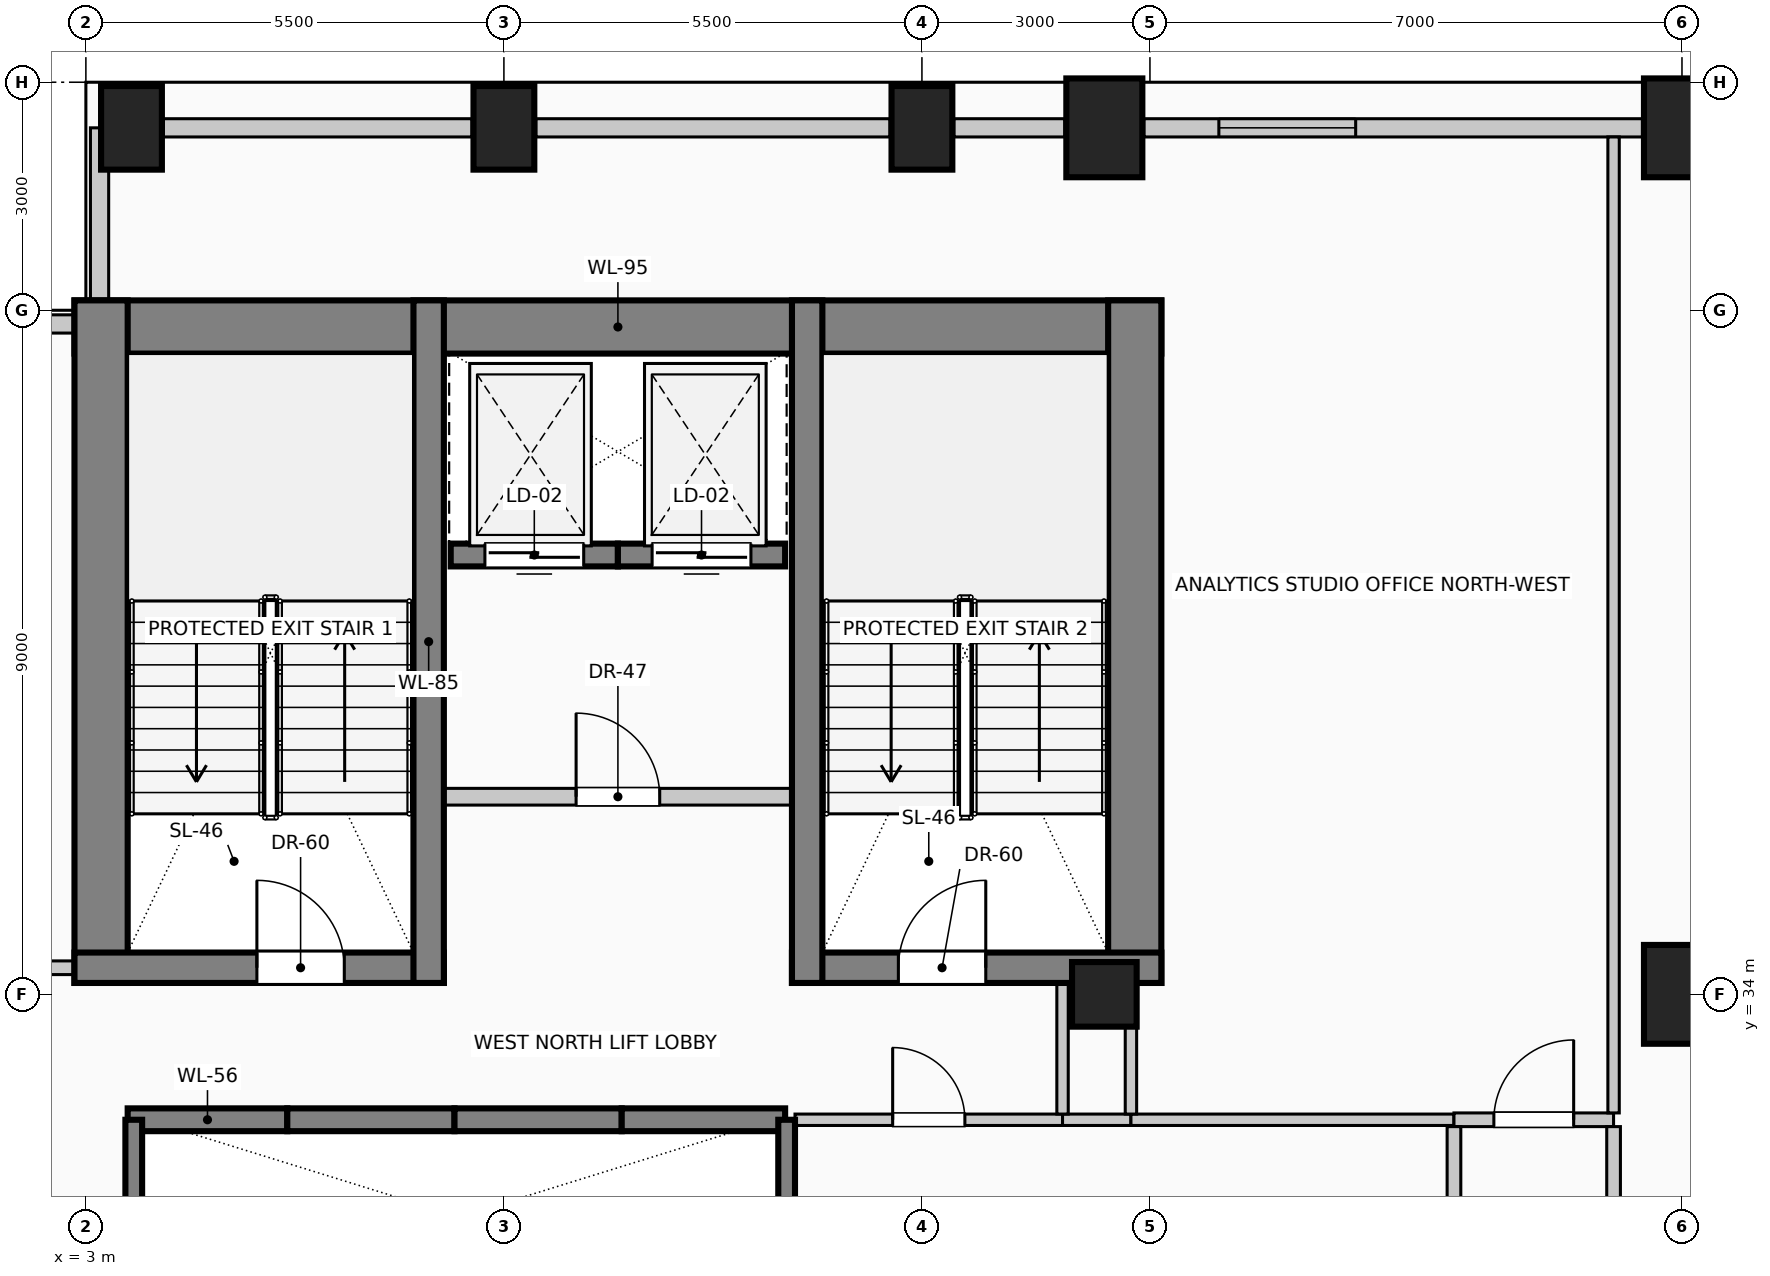
"""IFC4 building model, lengths in metres.
Left out: names, types, materials, properties, quantities, classifications, styles, units other than length and angle.
Written with IfcOpenShell. Run it as: python <this file> out.ifc"""

import sys

from ifc_helpers import new_model, si_unit, direction, frame, frame_2d, origin, origin_2d, place, context, subcontext, project, spatial, rectangle, circle, extrude, element, fill, save


model = new_model("IFC4")
c1 = context("Model", 3, precision=1e-05, world=origin(), true_north=direction((0.0, 1.0)))
c2 = subcontext(c1, "Body", "Model", "MODEL_VIEW")
j1 = project(units=[si_unit("LENGTHUNIT", "METRE"), si_unit("PLANEANGLEUNIT", "RADIAN")], contexts=[c1])
p1 = place(None, origin())
s1 = spatial("IfcSite", under=j1, at=p1, CompositionType="ELEMENT")
p2 = place(p1, origin())
s2 = spatial("IfcBuilding", under=s1, at=p2, CompositionType="ELEMENT")
p3 = place(p2, frame((0.0, 0.0, 206.6)))
s3 = spatial("IfcBuildingStorey", under=s2, at=p3, CompositionType="ELEMENT", Elevation=206.6)
p4 = place(p3, frame((2.85, 42.78, 0.0), z_axis=(0.0, 0.0, 1.0), x_axis=(1.0, 0.0, 0.0)))
e1 = element("IfcWall", 1, at=p4, inside=s3, PredefinedType="SHEAR", context=c2, shape_type="SweptSolid", body=[
    extrude(rectangle(XDim=14.3, YDim=0.7, at=frame_2d((7.15, 0.0))), origin(), (0.0, 0.0, 1.0), 4.0),
])
for number, where, z_axis, x_axis in (
    (2, (3.2, 34.15, 0.0), (0.0, 0.0, 1.0), (0.0, 1.0, 0.0)),
    (3, (16.8, 34.15, 0.0), (0.0, 0.0, 1.0), (0.0, 1.0, 0.0)),
):
    element("IfcWall", number, at=place(p3, frame(where, z_axis=z_axis, x_axis=x_axis)), inside=s3, PredefinedType="SHEAR", context=c2, shape_type="SweptSolid", body=[
        extrude(rectangle(XDim=8.98, YDim=0.7, at=frame_2d((4.49, 0.0))), origin(), (0.0, 0.0, 1.0), 4.0),
    ])
p5 = place(p3, frame((2.85, 34.35, 0.0), z_axis=(0.0, 0.0, 1.0), x_axis=(1.0, 0.0, 0.0)))
e4 = element("IfcWall", 4, at=p5, inside=s3, PredefinedType="SHEAR", context=c2, shape_type="SweptSolid", body=[
    extrude(rectangle(XDim=4.86, YDim=0.4, at=frame_2d((2.43, 0.0))), origin(), (0.0, 0.0, 1.0), 4.0),
])
p6 = place(p5, frame((2.4, 0.0, 0.0)))
e5 = element("IfcOpeningElement", 5, at=p6, cuts=e4, PredefinedType="OPENING", context=c2, shape_type="SweptSolid", body=[
    extrude(rectangle(XDim=1.15, YDim=2.2, at=frame_2d((0.575, 1.1))), frame((0.0, 0.21, 0.0), z_axis=(0.0, -1.0, 0.0), x_axis=(1.0, 0.0, 0.0)), (0.0, 0.0, 1.0), 0.42),
])
p7 = place(p3, frame((12.29, 34.35, 0.0), z_axis=(0.0, 0.0, 1.0), x_axis=(1.0, 0.0, 0.0)))
e6 = element("IfcWall", 6, at=p7, inside=s3, PredefinedType="SHEAR", context=c2, shape_type="SweptSolid", body=[
    extrude(rectangle(XDim=4.86, YDim=0.4, at=frame_2d((2.43, 0.0))), origin(), (0.0, 0.0, 1.0), 4.0),
])
p8 = place(p7, frame((1.4, 0.0, 0.0)))
e7 = element("IfcOpeningElement", 7, at=p8, cuts=e6, PredefinedType="OPENING", context=c2, shape_type="SweptSolid", body=[
    extrude(rectangle(XDim=1.15, YDim=2.2, at=frame_2d((0.575, 1.1))), frame((0.0, 0.21, 0.0), z_axis=(0.0, -1.0, 0.0), x_axis=(1.0, 0.0, 0.0)), (0.0, 0.0, 1.0), 0.42),
])
for number, where, z_axis, x_axis in (
    (8, (7.51, 34.15, 0.0), (0.0, 0.0, 1.0), (0.0, 1.0, 0.0)),
    (9, (12.49, 34.15, 0.0), (0.0, 0.0, 1.0), (0.0, 1.0, 0.0)),
):
    element("IfcWall", number, at=place(p3, frame(where, z_axis=z_axis, x_axis=x_axis)), inside=s3, PredefinedType="SHEAR", context=c2, shape_type="SweptSolid", body=[
        extrude(rectangle(XDim=8.98, YDim=0.4, at=frame_2d((4.49, 0.0))), origin(), (0.0, 0.0, 1.0), 4.0),
    ])
for number, where, z_axis, x_axis in (
    (10, (3.6, 45.4, 0.0), (0.0, 0.0, 1.0), (1.0, 0.0, 0.0)),
    (11, (8.5, 45.4, 0.0), (0.0, 0.0, 1.0), (1.0, 0.0, 0.0)),
    (12, (14.0, 45.4, 0.0), (0.0, 0.0, 1.0), (1.0, 0.0, 0.0)),
):
    element("IfcColumn", number, at=place(p3, frame(where, z_axis=z_axis, x_axis=x_axis)), inside=s3, PredefinedType="COLUMN", context=c2, shape_type="SweptSolid", body=[
        extrude(rectangle(XDim=0.8, YDim=1.1, at=origin_2d()), origin(), (0.0, 0.0, 1.0), 4.0),
    ])
for number, where, z_axis, x_axis in (
    (13, (16.4, 45.4, 0.0), (0.0, 0.0, 1.0), (1.0, 0.0, 0.0)),
    (14, (24.0, 45.4, 0.0), (0.0, 0.0, 1.0), (1.0, 0.0, 0.0)),
    (15, (24.0, 34.0, 0.0), (0.0, 0.0, 1.0), (1.0, 0.0, 0.0)),
):
    element("IfcColumn", number, at=place(p3, frame(where, z_axis=z_axis, x_axis=x_axis)), inside=s3, PredefinedType="COLUMN", context=c2, shape_type="SweptSolid", body=[
        extrude(rectangle(XDim=1.0, YDim=1.3, at=origin_2d()), origin(), (0.0, 0.0, 1.0), 4.0),
    ])
p9 = place(p3, frame((16.4, 34.0, 0.0), z_axis=(0.0, 0.0, 1.0), x_axis=(1.0, 0.0, 0.0)))
e16 = element("IfcColumn", 16, at=p9, inside=s3, PredefinedType="COLUMN", context=c2, shape_type="SweptSolid", body=[
    extrude(circle(Radius=0.425, at=origin_2d()), origin(), (0.0, 0.0, 1.0), 4.0),
])
p10 = place(p3, frame((4.02, 45.4, 0.0), z_axis=(0.0, 0.0, 1.0), x_axis=(1.0, 0.0, 0.0)))
e17 = element("IfcWall", 17, at=p10, inside=s3, PredefinedType="SOLIDWALL", context=c2, shape_type="SweptSolid", body=[
    extrude(rectangle(XDim=4.06, YDim=0.24, at=frame_2d((2.03, 0.0))), origin(), (0.0, 0.0, 1.0), 3.0),
])
p11 = place(p3, frame((8.92, 45.4, 0.0), z_axis=(0.0, 0.0, 1.0), x_axis=(1.0, 0.0, 0.0)))
e18 = element("IfcWall", 18, at=p11, inside=s3, PredefinedType="SOLIDWALL", context=c2, shape_type="SweptSolid", body=[
    extrude(rectangle(XDim=4.66, YDim=0.24, at=frame_2d((2.33, 0.0))), origin(), (0.0, 0.0, 1.0), 3.0),
])
p12 = place(p3, frame((14.42, 45.4, 0.0), z_axis=(0.0, 0.0, 1.0), x_axis=(1.0, 0.0, 0.0)))
e19 = element("IfcWall", 19, at=p12, inside=s3, PredefinedType="SOLIDWALL", context=c2, shape_type="SweptSolid", body=[
    extrude(rectangle(XDim=1.46, YDim=0.24, at=frame_2d((0.73, 0.0))), origin(), (0.0, 0.0, 1.0), 3.0),
])
p13 = place(p3, frame((16.92, 45.4, 0.0), z_axis=(0.0, 0.0, 1.0), x_axis=(1.0, 0.0, 0.0)))
e20 = element("IfcWall", 20, at=p13, inside=s3, PredefinedType="SOLIDWALL", context=c2, shape_type="SweptSolid", body=[
    extrude(rectangle(XDim=6.56, YDim=0.24, at=frame_2d((3.28, 0.0))), origin(), (0.0, 0.0, 1.0), 3.0),
])
p14 = place(p13, frame((0.987, 0.0, 0.42)))
e21 = element("IfcOpeningElement", 21, at=p14, cuts=e20, PredefinedType="OPENING", context=c2, shape_type="SweptSolid", body=[
    extrude(rectangle(XDim=1.8, YDim=2.2, at=frame_2d((0.9, 1.1))), frame((0.0, 0.13, 0.0), z_axis=(0.0, -1.0, 0.0), x_axis=(1.0, 0.0, 0.0)), (0.0, 0.0, 1.0), 0.26),
])
p15 = place(p3, frame((0.6, 42.82, 0.0), z_axis=(0.0, 0.0, 1.0), x_axis=(1.0, 0.0, 0.0)))
e22 = element("IfcWall", 22, at=p15, inside=s3, PredefinedType="SOLIDWALL", context=c2, shape_type="SweptSolid", body=[
    extrude(rectangle(XDim=2.245, YDim=0.24, at=frame_2d((1.123, 0.0))), origin(), (0.0, 0.0, 1.0), 3.75),
])
p16 = place(p3, frame((3.18, 43.135, 0.0), z_axis=(0.0, 0.0, 1.0), x_axis=(0.0, 1.0, 0.0)))
e23 = element("IfcWall", 23, at=p16, inside=s3, PredefinedType="SOLIDWALL", context=c2, shape_type="SweptSolid", body=[
    extrude(rectangle(XDim=2.265, YDim=0.24, at=frame_2d((1.132, 0.0))), origin(), (0.0, 0.0, 1.0), 3.75),
])
p17 = place(p3, frame((3.55, 32.35, 0.0), z_axis=(0.0, 0.0, 1.0), x_axis=(1.0, 0.0, 0.0)))
e24 = element("IfcWall", 24, at=p17, inside=s3, PredefinedType="SOLIDWALL", context=c2, shape_type="SweptSolid", body=[
    extrude(rectangle(XDim=2.1, YDim=0.3, at=frame_2d((1.05, 0.0))), origin(), (0.0, 0.0, 1.0), 4.0),
])
p18 = place(p3, frame((5.65, 32.35, 0.0), z_axis=(0.0, 0.0, 1.0), x_axis=(1.0, 0.0, 0.0)))
e25 = element("IfcWall", 25, at=p18, inside=s3, PredefinedType="SOLIDWALL", context=c2, shape_type="SweptSolid", body=[
    extrude(rectangle(XDim=2.2, YDim=0.3, at=frame_2d((1.1, 0.0))), origin(), (0.0, 0.0, 1.0), 4.0),
])
p19 = place(p3, frame((7.85, 32.35, 0.0), z_axis=(0.0, 0.0, 1.0), x_axis=(1.0, 0.0, 0.0)))
e26 = element("IfcWall", 26, at=p19, inside=s3, PredefinedType="SOLIDWALL", context=c2, shape_type="SweptSolid", body=[
    extrude(rectangle(XDim=2.2, YDim=0.3, at=frame_2d((1.1, 0.0))), origin(), (0.0, 0.0, 1.0), 4.0),
])
p20 = place(p3, frame((10.05, 32.35, 0.0), z_axis=(0.0, 0.0, 1.0), x_axis=(1.0, 0.0, 0.0)))
e27 = element("IfcWall", 27, at=p20, inside=s3, PredefinedType="SOLIDWALL", context=c2, shape_type="SweptSolid", body=[
    extrude(rectangle(XDim=2.15, YDim=0.3, at=frame_2d((1.075, 0.0))), origin(), (0.0, 0.0, 1.0), 4.0),
])
p21 = place(p3, frame((10.0, 39.78, 0.0), z_axis=(0.0, 0.0, 1.0), x_axis=(-1.0, 0.0, 0.0)))
e28 = element("IfcWall", 28, at=p21, inside=s3, PredefinedType="SOLIDWALL", context=c2, shape_type="SweptSolid", body=[
    extrude(rectangle(XDim=2.2, YDim=0.3, at=frame_2d((1.1, 0.0))), origin(), (0.0, 0.0, 1.0), 4.0),
])
p22 = place(p21, frame((0.45, 0.0, 0.0)))
e29 = element("IfcOpeningElement", 29, at=p22, cuts=e28, PredefinedType="OPENING", context=c2, shape_type="SweptSolid", body=[
    extrude(rectangle(XDim=1.3, YDim=2.25, at=frame_2d((0.65, 1.125))), frame((0.0, 0.16, 0.0), z_axis=(0.0, -1.0, 0.0), x_axis=(1.0, 0.0, 0.0)), (0.0, 0.0, 1.0), 0.32),
])
p23 = place(p3, frame((12.2, 39.78, 0.0), z_axis=(0.0, 0.0, 1.0), x_axis=(-1.0, 0.0, 0.0)))
e30 = element("IfcWall", 30, at=p23, inside=s3, PredefinedType="SOLIDWALL", context=c2, shape_type="SweptSolid", body=[
    extrude(rectangle(XDim=2.2, YDim=0.3, at=frame_2d((1.1, 0.0))), origin(), (0.0, 0.0, 1.0), 4.0),
])
p24 = place(p23, frame((0.45, 0.0, 0.0)))
e31 = element("IfcOpeningElement", 31, at=p24, cuts=e30, PredefinedType="OPENING", context=c2, shape_type="SweptSolid", body=[
    extrude(rectangle(XDim=1.3, YDim=2.25, at=frame_2d((0.65, 1.125))), frame((0.0, 0.16, 0.0), z_axis=(0.0, -1.0, 0.0), x_axis=(1.0, 0.0, 0.0)), (0.0, 0.0, 1.0), 0.32),
])
p25 = place(p3, frame((3.63, 26.8, 0.0), z_axis=(0.0, 0.0, 1.0), x_axis=(0.0, 1.0, 0.0)))
e32 = element("IfcWall", 32, at=p25, inside=s3, PredefinedType="SOLIDWALL", context=c2, shape_type="SweptSolid", body=[
    extrude(rectangle(XDim=5.55, YDim=0.22, at=frame_2d((2.775, 0.0))), origin(), (0.0, 0.0, 1.0), 4.0),
])
p26 = place(p3, frame((12.22, 29.75, 0.0), z_axis=(0.0, 0.0, 1.0), x_axis=(0.0, 1.0, 0.0)))
e33 = element("IfcWall", 33, at=p26, inside=s3, PredefinedType="SOLIDWALL", context=c2, shape_type="SweptSolid", body=[
    extrude(rectangle(XDim=2.6, YDim=0.22, at=frame_2d((1.3, 0.0))), origin(), (0.0, 0.0, 1.0), 4.0),
])
p27 = place(p3, frame((7.51, 36.6, 0.0), z_axis=(0.0, 0.0, 1.0), x_axis=(1.0, 0.0, 0.0)))
e34 = element("IfcWall", 34, at=p27, inside=s3, PredefinedType="PARTITIONING", context=c2, shape_type="SweptSolid", body=[
    extrude(rectangle(XDim=4.98, YDim=0.22, at=frame_2d((2.49, 0.0))), origin(), (0.0, 0.0, 1.0), 3.75),
])
p28 = place(p27, frame((1.94, 0.0, 0.0)))
e35 = element("IfcOpeningElement", 35, at=p28, cuts=e34, PredefinedType="OPENING", context=c2, shape_type="SweptSolid", body=[
    extrude(rectangle(XDim=1.1, YDim=2.2, at=frame_2d((0.55, 1.1))), frame((0.0, 0.12, 0.0), z_axis=(0.0, -1.0, 0.0), x_axis=(1.0, 0.0, 0.0)), (0.0, 0.0, 1.0), 0.24),
])
p29 = place(p3, frame((12.33, 32.35, 0.0), z_axis=(0.0, 0.0, 1.0), x_axis=(1.0, 0.0, 0.0)))
e36 = element("IfcWall", 36, at=p29, inside=s3, PredefinedType="PARTITIONING", context=c2, shape_type="SweptSolid", body=[
    extrude(rectangle(XDim=3.52, YDim=0.15, at=frame_2d((1.76, 0.0))), origin(), (0.0, 0.0, 1.0), 3.75),
])
p30 = place(p29, frame((1.285, 0.0, 0.0)))
e37 = element("IfcOpeningElement", 37, at=p30, cuts=e36, PredefinedType="OPENING", context=c2, shape_type="SweptSolid", body=[
    extrude(rectangle(XDim=0.95, YDim=2.15, at=frame_2d((0.475, 1.075))), frame((0.0, 0.085, 0.0), z_axis=(0.0, -1.0, 0.0), x_axis=(1.0, 0.0, 0.0)), (0.0, 0.0, 1.0), 0.17),
])
p31 = place(p3, frame((15.85, 32.35, 0.0), z_axis=(0.0, 0.0, 1.0), x_axis=(1.0, 0.0, 0.0)))
e38 = element("IfcWall", 38, at=p31, inside=s3, PredefinedType="PARTITIONING", context=c2, shape_type="SweptSolid", body=[
    extrude(rectangle(XDim=0.9, YDim=0.15, at=frame_2d((0.45, 0.0))), origin(), (0.0, 0.0, 1.0), 3.75),
])
p32 = place(p3, frame((16.75, 32.35, 0.0), z_axis=(0.0, 0.0, 1.0), x_axis=(1.0, 0.0, 0.0)))
e39 = element("IfcWall", 39, at=p32, inside=s3, PredefinedType="PARTITIONING", context=c2, shape_type="SweptSolid", body=[
    extrude(rectangle(XDim=4.25, YDim=0.15, at=frame_2d((2.125, 0.0))), origin(), (0.0, 0.0, 1.0), 3.75),
])
p33 = place(p3, frame((21.0, 32.35, 0.0), z_axis=(0.0, 0.0, 1.0), x_axis=(1.0, 0.0, 0.0)))
e40 = element("IfcWall", 40, at=p33, inside=s3, PredefinedType="PARTITIONING", context=c2, shape_type="SweptSolid", body=[
    extrude(rectangle(XDim=2.1, YDim=0.18, at=frame_2d((1.05, 0.0))), origin(), (0.0, 0.0, 1.0), 3.75),
])
p34 = place(p33, frame((0.525, 0.0, 0.0)))
e41 = element("IfcOpeningElement", 41, at=p34, cuts=e40, PredefinedType="OPENING", context=c2, shape_type="SweptSolid", body=[
    extrude(rectangle(XDim=1.05, YDim=2.15, at=frame_2d((0.525, 1.075))), frame((0.0, 0.1, 0.0), z_axis=(0.0, -1.0, 0.0), x_axis=(1.0, 0.0, 0.0)), (0.0, 0.0, 1.0), 0.2),
])
p35 = place(p3, frame((1.15, 34.35, 0.0), z_axis=(0.0, 0.0, 1.0), x_axis=(1.0, 0.0, 0.0)))
e42 = element("IfcWall", 42, at=p35, inside=s3, PredefinedType="PARTITIONING", context=c2, shape_type="SweptSolid", body=[
    extrude(rectangle(XDim=1.7, YDim=0.18, at=frame_2d((0.85, 0.0))), origin(), (0.0, 0.0, 1.0), 3.75),
])
p36 = place(p3, frame((15.85, 32.425, 0.0), z_axis=(0.0, 0.0, 1.0), x_axis=(0.0, 1.0, 0.0)))
e43 = element("IfcWall", 43, at=p36, inside=s3, PredefinedType="PARTITIONING", context=c2, shape_type="SweptSolid", body=[
    extrude(rectangle(XDim=1.725, YDim=0.15, at=frame_2d((0.862, 0.0))), origin(), (0.0, 0.0, 1.0), 3.75),
])
p37 = place(p3, frame((16.75, 32.425, 0.0), z_axis=(0.0, 0.0, 1.0), x_axis=(0.0, 1.0, 0.0)))
e44 = element("IfcWall", 44, at=p37, inside=s3, PredefinedType="PARTITIONING", context=c2, shape_type="SweptSolid", body=[
    extrude(rectangle(XDim=1.15, YDim=0.15, at=frame_2d((0.575, 0.0))), origin(), (0.0, 0.0, 1.0), 3.75),
])
p38 = place(p3, frame((21.0, 28.675, 0.0), z_axis=(0.0, 0.0, 1.0), x_axis=(0.0, 1.0, 0.0)))
e45 = element("IfcWall", 45, at=p38, inside=s3, PredefinedType="PARTITIONING", context=c2, shape_type="SweptSolid", body=[
    extrude(rectangle(XDim=3.585, YDim=0.18, at=frame_2d((1.792, 0.0))), origin(), (0.0, 0.0, 1.0), 3.75),
])
p39 = place(p3, frame((23.1, 29.14, 0.0), z_axis=(0.0, 0.0, 1.0), x_axis=(0.0, 1.0, 0.0)))
e46 = element("IfcWall", 46, at=p39, inside=s3, PredefinedType="PARTITIONING", context=c2, shape_type="SweptSolid", body=[
    extrude(rectangle(XDim=3.12, YDim=0.18, at=frame_2d((1.56, 0.0))), origin(), (0.0, 0.0, 1.0), 3.75),
])
p40 = place(p3, frame((23.1, 32.44, 0.0), z_axis=(0.0, 0.0, 1.0), x_axis=(0.0, 1.0, 0.0)))
e47 = element("IfcWall", 47, at=p40, inside=s3, PredefinedType="PARTITIONING", context=c2, shape_type="SweptSolid", body=[
    extrude(rectangle(XDim=12.84, YDim=0.15, at=frame_2d((6.42, 0.0))), origin(), (0.0, 0.0, 1.0), 3.75),
])
p41 = place(p14, origin())
e48 = element("IfcWindow", 48, at=p41, inside=s3, PartitioningType="SINGLE_PANEL", PredefinedType="WINDOW", context=c2, shape_type="SweptSolid", body=[
    extrude(rectangle(XDim=1.8, YDim=2.2, at=frame_2d((0.9, 1.1))), frame((0.0, 0.03, 0.0), z_axis=(0.0, -1.0, 0.0), x_axis=(1.0, 0.0, 0.0)), (0.0, 0.0, 1.0), 0.06),
])
fill(e21, e48)
p42 = place(p22, origin())
e49 = element("IfcDoor", 49, at=p42, inside=s3, OperationType="SLIDING_TO_LEFT", PredefinedType="DOOR", context=c2, shape_type="SweptSolid", body=[
    extrude(rectangle(XDim=1.3, YDim=2.25, at=frame_2d((0.65, 1.125))), frame((0.0, 0.025, 0.0), z_axis=(0.0, -1.0, 0.0), x_axis=(1.0, 0.0, 0.0)), (0.0, 0.0, 1.0), 0.05),
])
fill(e29, e49)
p43 = place(p24, origin())
e50 = element("IfcDoor", 50, at=p43, inside=s3, OperationType="SLIDING_TO_RIGHT", PredefinedType="DOOR", context=c2, shape_type="SweptSolid", body=[
    extrude(rectangle(XDim=1.3, YDim=2.25, at=frame_2d((0.65, 1.125))), frame((0.0, 0.025, 0.0), z_axis=(0.0, -1.0, 0.0), x_axis=(1.0, 0.0, 0.0)), (0.0, 0.0, 1.0), 0.05),
])
fill(e31, e50)
p44 = place(p6, origin())
e51 = element("IfcDoor", 51, at=p44, inside=s3, OperationType="SINGLE_SWING_LEFT", PredefinedType="DOOR", context=c2, shape_type="SweptSolid", body=[
    extrude(rectangle(XDim=1.15, YDim=2.2, at=frame_2d((0.575, 1.1))), frame((0.0, 0.025, 0.0), z_axis=(0.0, -1.0, 0.0), x_axis=(1.0, 0.0, 0.0)), (0.0, 0.0, 1.0), 0.05),
])
fill(e5, e51)
p45 = place(p8, origin())
e52 = element("IfcDoor", 52, at=p45, inside=s3, OperationType="SINGLE_SWING_RIGHT", PredefinedType="DOOR", context=c2, shape_type="SweptSolid", body=[
    extrude(rectangle(XDim=1.15, YDim=2.2, at=frame_2d((0.575, 1.1))), frame((0.0, 0.025, 0.0), z_axis=(0.0, -1.0, 0.0), x_axis=(1.0, 0.0, 0.0)), (0.0, 0.0, 1.0), 0.05),
])
fill(e7, e52)
p46 = place(p28, origin())
e53 = element("IfcDoor", 53, at=p46, inside=s3, OperationType="SINGLE_SWING_LEFT", PredefinedType="DOOR", context=c2, shape_type="SweptSolid", body=[
    extrude(rectangle(XDim=1.1, YDim=2.2, at=frame_2d((0.55, 1.1))), frame((0.0, 0.025, 0.0), z_axis=(0.0, -1.0, 0.0), x_axis=(1.0, 0.0, 0.0)), (0.0, 0.0, 1.0), 0.05),
])
fill(e35, e53)
p47 = place(p30, origin())
e54 = element("IfcDoor", 54, at=p47, inside=s3, OperationType="SINGLE_SWING_LEFT", PredefinedType="DOOR", context=c2, shape_type="SweptSolid", body=[
    extrude(rectangle(XDim=0.95, YDim=2.15, at=frame_2d((0.475, 1.075))), frame((0.0, 0.025, 0.0), z_axis=(0.0, -1.0, 0.0), x_axis=(1.0, 0.0, 0.0)), (0.0, 0.0, 1.0), 0.05),
])
fill(e37, e54)
p48 = place(p34, origin())
e55 = element("IfcDoor", 55, at=p48, inside=s3, OperationType="SINGLE_SWING_RIGHT", PredefinedType="DOOR", context=c2, shape_type="SweptSolid", body=[
    extrude(rectangle(XDim=1.05, YDim=2.15, at=frame_2d((0.525, 1.075))), frame((0.0, 0.025, 0.0), z_axis=(0.0, -1.0, 0.0), x_axis=(1.0, 0.0, 0.0)), (0.0, 0.0, 1.0), 0.05),
])
fill(e41, e55)
save(model, sys.argv[1])
